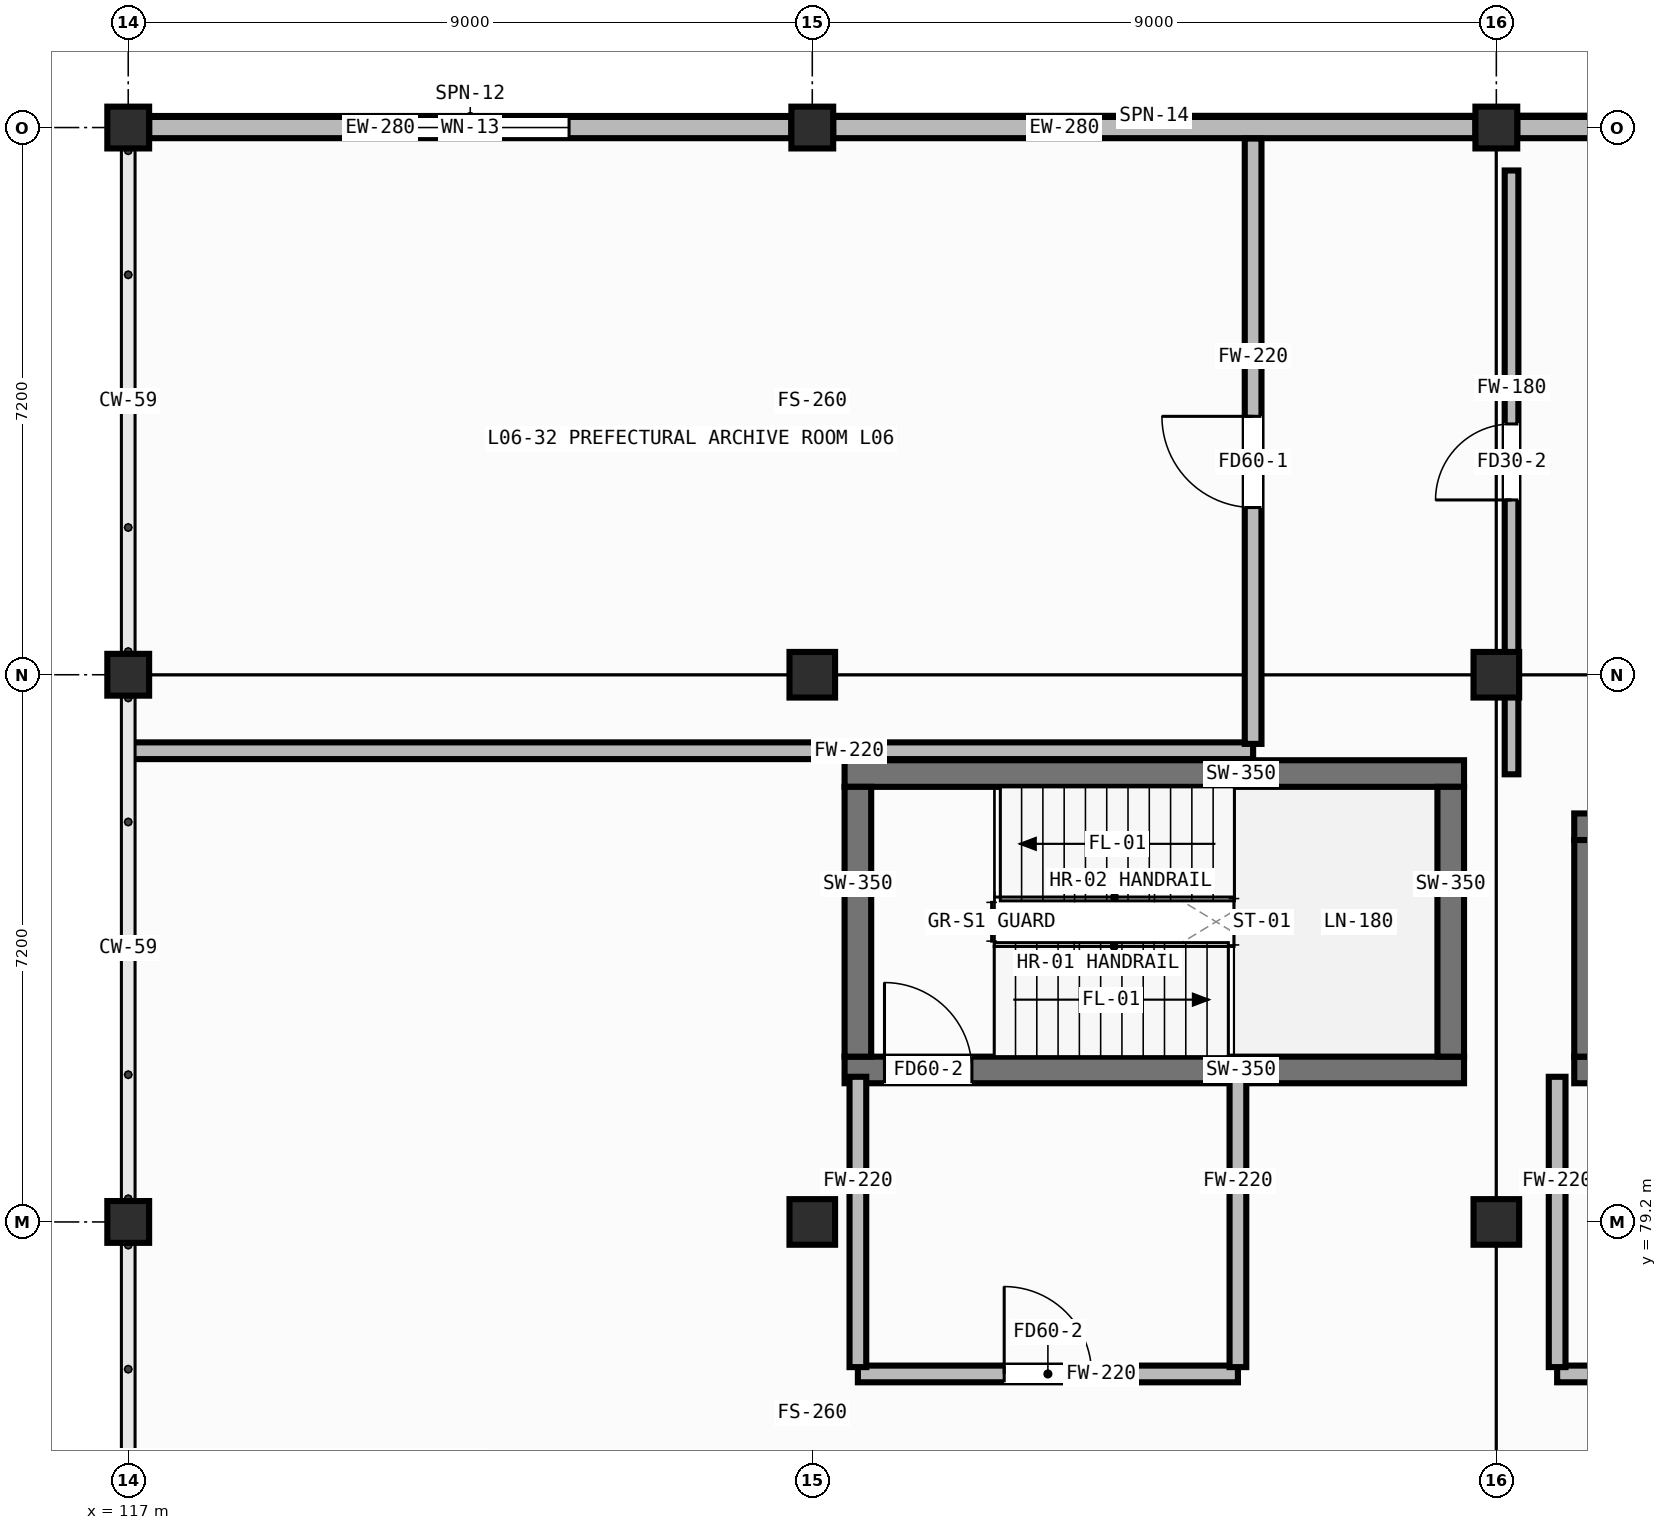
"""IFC4 building model, lengths in metres.
Left out: names, types, materials, properties, quantities, classifications, styles, units other than length and angle.
Written with IfcOpenShell. Run it as: python <this file> out.ifc"""

import sys

from ifc_helpers import new_model, si_unit, direction, frame, frame_2d, origin, origin_2d, place, context, subcontext, project, spatial, rectangle, hollow_rectangle, extrude, element, fill, save


model = new_model("IFC4")
c1 = context("Model", 3, precision=1e-05, world=origin(), true_north=direction((0.0, 1.0)))
c2 = subcontext(c1, "Body", "Model", "MODEL_VIEW")
j1 = project(units=[si_unit("LENGTHUNIT", "METRE"), si_unit("PLANEANGLEUNIT", "RADIAN")], contexts=[c1])
p1 = place(None, origin())
s1 = spatial("IfcSite", under=j1, at=p1, CompositionType="ELEMENT")
p2 = place(p1, origin())
s2 = spatial("IfcBuilding", under=s1, at=p2, CompositionType="ELEMENT")
p3 = place(p2, frame((0.0, 0.0, 20.6)))
s3 = spatial("IfcBuildingStorey", under=s2, at=p3, CompositionType="ELEMENT", Elevation=20.6)
for number, where, z_axis, x_axis in (
    (1, (117.0, 79.2, 0.0), (0.0, 0.0, 1.0), (1.0, 0.0, 0.0)),
    (2, (117.0, 86.4, 0.0), (0.0, 0.0, 1.0), (1.0, 0.0, 0.0)),
    (3, (117.0, 93.6, 0.0), (0.0, 0.0, 1.0), (1.0, 0.0, 0.0)),
):
    element("IfcColumn", number, at=place(p3, frame(where, z_axis=z_axis, x_axis=x_axis)), inside=s3, PredefinedType="COLUMN", context=c2, shape_type="SweptSolid", body=[
        extrude(hollow_rectangle(XDim=0.55, YDim=0.55, WallThickness=0.022, at=origin_2d()), origin(), (0.0, 0.0, 1.0), 3.36),
    ])
for number, where, z_axis, x_axis in (
    (4, (126.0, 79.2, 0.0), (0.0, 0.0, 1.0), (1.0, 0.0, 0.0)),
    (5, (126.0, 86.4, 0.0), (0.0, 0.0, 1.0), (1.0, 0.0, 0.0)),
):
    element("IfcColumn", number, at=place(p3, frame(where, z_axis=z_axis, x_axis=x_axis)), inside=s3, PredefinedType="COLUMN", context=c2, shape_type="SweptSolid", body=[
        extrude(hollow_rectangle(XDim=0.6, YDim=0.6, WallThickness=0.025, at=origin_2d()), origin(), (0.0, 0.0, 1.0), 3.6),
    ])
p4 = place(p3, frame((126.0, 93.6, 0.0), z_axis=(0.0, 0.0, 1.0), x_axis=(1.0, 0.0, 0.0)))
e6 = element("IfcColumn", 6, at=p4, inside=s3, PredefinedType="COLUMN", context=c2, shape_type="SweptSolid", body=[
    extrude(hollow_rectangle(XDim=0.55, YDim=0.55, WallThickness=0.022, at=origin_2d()), origin(), (0.0, 0.0, 1.0), 3.6),
])
for number, where, z_axis, x_axis in (
    (7, (135.0, 79.2, 0.0), (0.0, 0.0, 1.0), (1.0, 0.0, 0.0)),
    (8, (135.0, 86.4, 0.0), (0.0, 0.0, 1.0), (1.0, 0.0, 0.0)),
):
    element("IfcColumn", number, at=place(p3, frame(where, z_axis=z_axis, x_axis=x_axis)), inside=s3, PredefinedType="COLUMN", context=c2, shape_type="SweptSolid", body=[
        extrude(hollow_rectangle(XDim=0.6, YDim=0.6, WallThickness=0.025, at=origin_2d()), origin(), (0.0, 0.0, 1.0), 3.6),
    ])
p5 = place(p3, frame((135.0, 93.6, 0.0), z_axis=(0.0, 0.0, 1.0), x_axis=(1.0, 0.0, 0.0)))
e9 = element("IfcColumn", 9, at=p5, inside=s3, PredefinedType="COLUMN", context=c2, shape_type="SweptSolid", body=[
    extrude(hollow_rectangle(XDim=0.55, YDim=0.55, WallThickness=0.022, at=origin_2d()), origin(), (0.0, 0.0, 1.0), 3.6),
])
p6 = place(p3, frame((125.725, 93.6, 0.0), z_axis=(0.0, 0.0, 1.0), x_axis=(-1.0, 0.0, 0.0)))
e10 = element("IfcWall", 10, at=p6, inside=s3, PredefinedType="STANDARD", context=c2, shape_type="SweptSolid", body=[
    extrude(rectangle(XDim=8.45, YDim=0.28, at=frame_2d((4.225, 0.0))), origin(), (0.0, 0.0, 1.0), 2.96),
])
p7 = place(p6, frame((2.925, 0.0, 0.85)))
e11 = element("IfcOpeningElement", 11, at=p7, cuts=e10, PredefinedType="OPENING", context=c2, shape_type="SweptSolid", body=[
    extrude(rectangle(XDim=2.6, YDim=1.6, at=frame_2d((1.3, 0.8))), frame((0.0, 0.152, 0.0), z_axis=(0.0, -1.0, 0.0), x_axis=(1.0, 0.0, 0.0)), (0.0, 0.0, 1.0), 0.304),
])
p8 = place(p3, frame((134.725, 93.6, 0.0), z_axis=(0.0, 0.0, 1.0), x_axis=(-1.0, 0.0, 0.0)))
e12 = element("IfcWall", 12, at=p8, inside=s3, PredefinedType="STANDARD", context=c2, shape_type="SweptSolid", body=[
    extrude(rectangle(XDim=8.45, YDim=0.28, at=frame_2d((4.225, 0.0))), origin(), (0.0, 0.0, 1.0), 2.92),
])
p9 = place(p3, frame((143.725, 93.6, 0.0), z_axis=(0.0, 0.0, 1.0), x_axis=(-1.0, 0.0, 0.0)))
e13 = element("IfcWall", 13, at=p9, inside=s3, PredefinedType="STANDARD", context=c2, shape_type="SweptSolid", body=[
    extrude(rectangle(XDim=8.45, YDim=0.28, at=frame_2d((4.225, 0.0))), origin(), (0.0, 0.0, 1.0), 2.92),
])
p10 = place(p9, frame((2.925, 0.0, 0.85)))
e14 = element("IfcOpeningElement", 14, at=p10, cuts=e13, PredefinedType="OPENING", context=c2, shape_type="SweptSolid", body=[
    extrude(rectangle(XDim=2.6, YDim=1.6, at=frame_2d((1.3, 0.8))), frame((0.0, 0.152, 0.0), z_axis=(0.0, -1.0, 0.0), x_axis=(1.0, 0.0, 0.0)), (0.0, 0.0, 1.0), 0.304),
])
p11 = place(p3, frame((126.425, 81.2, 0.0), z_axis=(0.0, 0.0, 1.0), x_axis=(1.0, 0.0, 0.0)))
e15 = element("IfcWall", 15, at=p11, inside=s3, PredefinedType="SHEAR", context=c2, shape_type="SweptSolid", body=[
    extrude(rectangle(XDim=8.15, YDim=0.35, at=frame_2d((4.075, 0.0))), origin(), (0.0, 0.0, 1.0), 3.32),
])
p12 = place(p11, frame((0.525, 0.0, 0.0)))
e16 = element("IfcOpeningElement", 16, at=p12, cuts=e15, PredefinedType="OPENING", context=c2, shape_type="SweptSolid", body=[
    extrude(rectangle(XDim=1.15, YDim=2.1, at=frame_2d((0.575, 1.05))), frame((0.0, 0.187, 0.0), z_axis=(0.0, -1.0, 0.0), x_axis=(1.0, 0.0, 0.0)), (0.0, 0.0, 1.0), 0.374),
])
p13 = place(p3, frame((126.425, 85.1, 0.0), z_axis=(0.0, 0.0, 1.0), x_axis=(1.0, 0.0, 0.0)))
e17 = element("IfcWall", 17, at=p13, inside=s3, PredefinedType="SHEAR", context=c2, shape_type="SweptSolid", body=[
    extrude(rectangle(XDim=8.15, YDim=0.35, at=frame_2d((4.075, 0.0))), origin(), (0.0, 0.0, 1.0), 3.32),
])
for number, where, z_axis, x_axis in (
    (18, (126.6, 81.375, 0.0), (0.0, 0.0, 1.0), (0.0, 1.0, 0.0)),
    (19, (134.4, 81.375, 0.0), (0.0, 0.0, 1.0), (0.0, 1.0, 0.0)),
):
    element("IfcWall", number, at=place(p3, frame(where, z_axis=z_axis, x_axis=x_axis)), inside=s3, PredefinedType="SHEAR", context=c2, shape_type="SweptSolid", body=[
        extrude(rectangle(XDim=3.55, YDim=0.35, at=frame_2d((1.775, 0.0))), origin(), (0.0, 0.0, 1.0), 3.32),
    ])
p14 = place(p3, frame((136.025, 81.2, 0.0), z_axis=(0.0, 0.0, 1.0), x_axis=(1.0, 0.0, 0.0)))
e20 = element("IfcWall", 20, at=p14, inside=s3, PredefinedType="SHEAR", context=c2, shape_type="SweptSolid", body=[
    extrude(rectangle(XDim=2.75, YDim=0.35, at=frame_2d((1.375, 0.0))), origin(), (0.0, 0.0, 1.0), 3.32),
])
p15 = place(p14, frame((0.8, 0.0, 0.0)))
e21 = element("IfcOpeningElement", 21, at=p15, cuts=e20, PredefinedType="OPENING", context=c2, shape_type="SweptSolid", body=[
    extrude(rectangle(XDim=1.15, YDim=2.12, at=frame_2d((0.575, 1.06))), frame((0.0, 0.187, 0.0), z_axis=(0.0, -1.0, 0.0), x_axis=(1.0, 0.0, 0.0)), (0.0, 0.0, 1.0), 0.374),
])
p16 = place(p3, frame((136.025, 84.4, 0.0), z_axis=(0.0, 0.0, 1.0), x_axis=(1.0, 0.0, 0.0)))
e22 = element("IfcWall", 22, at=p16, inside=s3, PredefinedType="SHEAR", context=c2, shape_type="SweptSolid", body=[
    extrude(rectangle(XDim=2.75, YDim=0.35, at=frame_2d((1.375, 0.0))), origin(), (0.0, 0.0, 1.0), 3.32),
])
p17 = place(p3, frame((136.2, 81.375, 0.0), z_axis=(0.0, 0.0, 1.0), x_axis=(0.0, 1.0, 0.0)))
e23 = element("IfcWall", 23, at=p17, inside=s3, PredefinedType="SHEAR", context=c2, shape_type="SweptSolid", body=[
    extrude(rectangle(XDim=2.85, YDim=0.35, at=frame_2d((1.425, 0.0))), origin(), (0.0, 0.0, 1.0), 3.32),
])
p18 = place(p3, frame((126.6, 77.2, 0.0), z_axis=(0.0, 0.0, 1.0), x_axis=(1.0, 0.0, 0.0)))
e24 = element("IfcWall", 24, at=p18, inside=s3, PredefinedType="PARTITIONING", context=c2, shape_type="SweptSolid", body=[
    extrude(rectangle(XDim=5.0, YDim=0.22, at=frame_2d((2.5, 0.0))), origin(), (0.0, 0.0, 1.0), 3.32),
])
p19 = place(p18, frame((1.925, 0.0, 0.0)))
e25 = element("IfcOpeningElement", 25, at=p19, cuts=e24, PredefinedType="OPENING", context=c2, shape_type="SweptSolid", body=[
    extrude(rectangle(XDim=1.15, YDim=2.1, at=frame_2d((0.575, 1.05))), frame((0.0, 0.122, 0.0), z_axis=(0.0, -1.0, 0.0), x_axis=(1.0, 0.0, 0.0)), (0.0, 0.0, 1.0), 0.244),
])
for number, where, z_axis, x_axis in (
    (26, (126.6, 77.29, 0.0), (0.0, 0.0, 1.0), (0.0, 1.0, 0.0)),
    (27, (131.6, 77.29, 0.0), (0.0, 0.0, 1.0), (0.0, 1.0, 0.0)),
):
    element("IfcWall", number, at=place(p3, frame(where, z_axis=z_axis, x_axis=x_axis)), inside=s3, PredefinedType="PARTITIONING", context=c2, shape_type="SweptSolid", body=[
        extrude(rectangle(XDim=3.82, YDim=0.22, at=frame_2d((1.91, 0.0))), origin(), (0.0, 0.0, 1.0), 3.32),
    ])
p20 = place(p3, frame((135.8, 77.2, 0.0), z_axis=(0.0, 0.0, 1.0), x_axis=(1.0, 0.0, 0.0)))
e28 = element("IfcWall", 28, at=p20, inside=s3, PredefinedType="PARTITIONING", context=c2, shape_type="SweptSolid", body=[
    extrude(rectangle(XDim=7.8, YDim=0.22, at=frame_2d((3.9, 0.0))), origin(), (0.0, 0.0, 1.0), 3.32),
])
p21 = place(p20, frame((3.175, 0.0, 0.0)))
e29 = element("IfcOpeningElement", 29, at=p21, cuts=e28, PredefinedType="OPENING", context=c2, shape_type="SweptSolid", body=[
    extrude(rectangle(XDim=1.05, YDim=2.02, at=frame_2d((0.525, 1.01))), frame((0.0, 0.122, 0.0), z_axis=(0.0, -1.0, 0.0), x_axis=(1.0, 0.0, 0.0)), (0.0, 0.0, 1.0), 0.244),
])
p22 = place(p3, frame((135.8, 77.29, 0.0), z_axis=(0.0, 0.0, 1.0), x_axis=(0.0, 1.0, 0.0)))
e30 = element("IfcWall", 30, at=p22, inside=s3, PredefinedType="PARTITIONING", context=c2, shape_type="SweptSolid", body=[
    extrude(rectangle(XDim=3.82, YDim=0.22, at=frame_2d((1.91, 0.0))), origin(), (0.0, 0.0, 1.0), 3.32),
])
p23 = place(p3, frame((117.035, 85.4, 0.0), z_axis=(0.0, 0.0, 1.0), x_axis=(1.0, 0.0, 0.0)))
e31 = element("IfcWall", 31, at=p23, inside=s3, PredefinedType="PARTITIONING", context=c2, shape_type="SweptSolid", body=[
    extrude(rectangle(XDim=14.765, YDim=0.22, at=frame_2d((7.383, 0.0))), origin(), (0.0, 0.0, 1.0), 3.36),
])
p24 = place(p3, frame((131.8, 85.49, 0.0), z_axis=(0.0, 0.0, 1.0), x_axis=(0.0, 1.0, 0.0)))
e32 = element("IfcWall", 32, at=p24, inside=s3, PredefinedType="PARTITIONING", context=c2, shape_type="SweptSolid", body=[
    extrude(rectangle(XDim=7.965, YDim=0.22, at=frame_2d((3.982, 0.0))), origin(), (0.0, 0.0, 1.0), 3.32),
])
p25 = place(p24, frame((3.11, 0.0, 0.0)))
e33 = element("IfcOpeningElement", 33, at=p25, cuts=e32, PredefinedType="OPENING", context=c2, shape_type="SweptSolid", body=[
    extrude(rectangle(XDim=1.2, YDim=2.1, at=frame_2d((0.6, 1.05))), frame((0.0, 0.122, 0.0), z_axis=(0.0, -1.0, 0.0), x_axis=(1.0, 0.0, 0.0)), (0.0, 0.0, 1.0), 0.244),
])
p26 = place(p3, frame((135.2, 85.09, 0.0), z_axis=(0.0, 0.0, 1.0), x_axis=(0.0, 1.0, 0.0)))
e34 = element("IfcWall", 34, at=p26, inside=s3, PredefinedType="PARTITIONING", context=c2, shape_type="SweptSolid", body=[
    extrude(rectangle(XDim=7.945, YDim=0.18, at=frame_2d((3.972, 0.0))), origin(), (0.0, 0.0, 1.0), 2.6),
])
p27 = place(p26, frame((3.61, 0.0, 0.0)))
e35 = element("IfcOpeningElement", 35, at=p27, cuts=e34, PredefinedType="OPENING", context=c2, shape_type="SweptSolid", body=[
    extrude(rectangle(XDim=1.0, YDim=2.08, at=frame_2d((0.5, 1.04))), frame((0.0, 0.102, 0.0), z_axis=(0.0, -1.0, 0.0), x_axis=(1.0, 0.0, 0.0)), (0.0, 0.0, 1.0), 0.204),
])
p28 = place(p7, origin())
e36 = element("IfcWindow", 36, at=p28, inside=s3, PartitioningType="DOUBLE_PANEL_VERTICAL", PredefinedType="WINDOW", context=c2, shape_type="SweptSolid", body=[
    extrude(rectangle(XDim=2.6, YDim=1.6, at=frame_2d((1.3, 0.8))), frame((0.0, 0.03, 0.0), z_axis=(0.0, -1.0, 0.0), x_axis=(1.0, 0.0, 0.0)), (0.0, 0.0, 1.0), 0.06),
])
fill(e11, e36)
p29 = place(p12, origin())
e37 = element("IfcDoor", 37, at=p29, inside=s3, OperationType="SINGLE_SWING_LEFT", PredefinedType="DOOR", context=c2, shape_type="SweptSolid", body=[
    extrude(rectangle(XDim=1.15, YDim=2.1, at=frame_2d((0.575, 1.05))), frame((0.0, 0.025, 0.0), z_axis=(0.0, -1.0, 0.0), x_axis=(1.0, 0.0, 0.0)), (0.0, 0.0, 1.0), 0.05),
])
fill(e16, e37)
p30 = place(p19, origin())
e38 = element("IfcDoor", 38, at=p30, inside=s3, OperationType="SINGLE_SWING_LEFT", PredefinedType="DOOR", context=c2, shape_type="SweptSolid", body=[
    extrude(rectangle(XDim=1.15, YDim=2.1, at=frame_2d((0.575, 1.05))), frame((0.0, 0.025, 0.0), z_axis=(0.0, -1.0, 0.0), x_axis=(1.0, 0.0, 0.0)), (0.0, 0.0, 1.0), 0.05),
])
fill(e25, e38)
p31 = place(p25, origin())
e39 = element("IfcDoor", 39, at=p31, inside=s3, OperationType="SINGLE_SWING_RIGHT", PredefinedType="DOOR", context=c2, shape_type="SweptSolid", body=[
    extrude(rectangle(XDim=1.2, YDim=2.1, at=frame_2d((0.6, 1.05))), frame((0.0, 0.025, 0.0), z_axis=(0.0, -1.0, 0.0), x_axis=(1.0, 0.0, 0.0)), (0.0, 0.0, 1.0), 0.05),
])
fill(e33, e39)
p32 = place(p27, origin())
e40 = element("IfcDoor", 40, at=p32, inside=s3, OperationType="SINGLE_SWING_LEFT", PredefinedType="DOOR", context=c2, shape_type="SweptSolid", body=[
    extrude(rectangle(XDim=1.0, YDim=2.08, at=frame_2d((0.5, 1.04))), frame((0.0, 0.025, 0.0), z_axis=(0.0, -1.0, 0.0), x_axis=(1.0, 0.0, 0.0)), (0.0, 0.0, 1.0), 0.05),
])
fill(e35, e40)
save(model, sys.argv[1])
